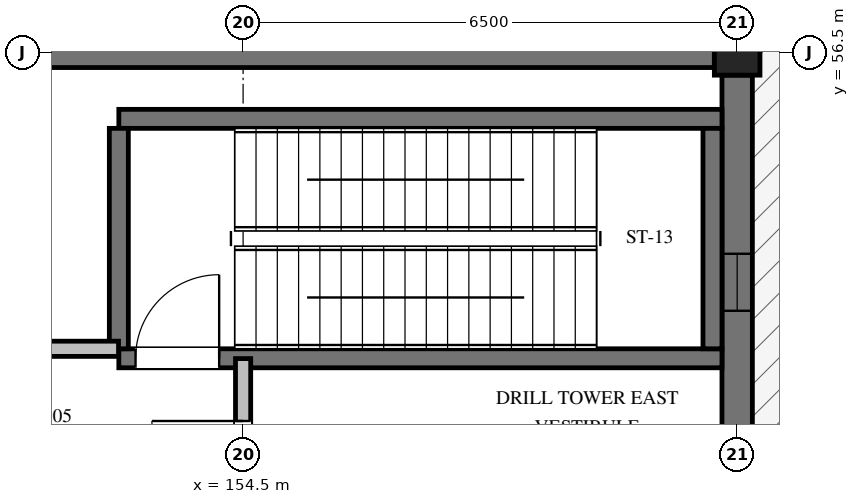
"""IFC4 building model, lengths in metres.
Left out: names, types, materials, properties, quantities, classifications, styles, units other than length and angle.
Written with IfcOpenShell. Run it as: python <this file> out.ifc"""

import sys

from ifc_helpers import new_model, si_unit, direction, frame, frame_2d, origin, origin_2d, place, context, subcontext, project, spatial, rectangle, extrude, element, fill, save


model = new_model("IFC4")
c1 = context("Model", 3, precision=1e-05, world=origin(), true_north=direction((0.0, 1.0)))
c2 = subcontext(c1, "Body", "Model", "MODEL_VIEW")
j1 = project(units=[si_unit("LENGTHUNIT", "METRE"), si_unit("PLANEANGLEUNIT", "RADIAN")], contexts=[c1])
p1 = place(None, origin())
s1 = spatial("IfcSite", under=j1, at=p1, CompositionType="ELEMENT")
p2 = place(p1, origin())
s2 = spatial("IfcBuilding", under=s1, at=p2, CompositionType="ELEMENT")
p3 = place(p2, frame((0.0, 0.0, 0.45)))
s3 = spatial("IfcBuildingStorey", under=s2, at=p3, CompositionType="ELEMENT", Elevation=0.45)
p4 = place(p3, frame((161.0, 56.5, -0.45), z_axis=(0.0, 0.0, 1.0), x_axis=(1.0, 0.0, 0.0)))
e1 = element("IfcColumn", 1, at=p4, inside=s3, PredefinedType="COLUMN", context=c2, shape_type="SweptSolid", body=[
    extrude(rectangle(XDim=0.6, YDim=0.6, at=origin_2d()), origin(), (0.0, 0.0, 1.0), 5.85),
])
p5 = place(p3, frame((148.3, 56.5, 0.0), z_axis=(0.0, 0.0, 1.0), x_axis=(1.0, 0.0, 0.0)))
e2 = element("IfcWall", 2, at=p5, inside=s3, PredefinedType="SHEAR", context=c2, shape_type="SweptSolid", body=[
    extrude(rectangle(XDim=12.4, YDim=0.4, at=frame_2d((6.2, 0.0))), origin(), (0.0, 0.0, 1.0), 5.2),
])
p6 = place(p5, frame((1.8, 0.0, 0.9)))
e3 = element("IfcOpeningElement", 3, at=p6, cuts=e2, PredefinedType="OPENING", context=c2, shape_type="SweptSolid", body=[
    extrude(rectangle(XDim=1.8, YDim=2.1, at=frame_2d((0.9, 1.05))), frame((0.0, 0.21, 0.0), z_axis=(0.0, -1.0, 0.0), x_axis=(1.0, 0.0, 0.0)), (0.0, 0.0, 1.0), 0.42),
])
p7 = place(p3, frame((161.0, 49.8, 0.0), z_axis=(0.0, 0.0, 1.0), x_axis=(0.0, 1.0, 0.0)))
e4 = element("IfcWall", 4, at=p7, inside=s3, PredefinedType="SHEAR", context=c2, shape_type="SweptSolid", body=[
    extrude(rectangle(XDim=6.4, YDim=0.4, at=frame_2d((3.2, 0.0))), origin(), (0.0, 0.0, 1.0), 5.2),
])
p8 = place(p7, frame((3.3, 0.0, 1.1)))
e5 = element("IfcOpeningElement", 5, at=p8, cuts=e4, PredefinedType="OPENING", context=c2, shape_type="SweptSolid", body=[
    extrude(rectangle(XDim=0.75, YDim=0.75, at=frame_2d((0.375, 0.375))), frame((0.0, 0.21, 0.0), z_axis=(0.0, -1.0, 0.0), x_axis=(1.0, 0.0, 0.0)), (0.0, 0.0, 1.0), 0.42),
])
p9 = place(p3, frame((152.865, 52.475, 0.0), z_axis=(0.0, 0.0, 1.0), x_axis=(1.0, 0.0, 0.0)))
e6 = element("IfcWall", 6, at=p9, inside=s3, PredefinedType="SHEAR", context=c2, shape_type="SweptSolid", body=[
    extrude(rectangle(XDim=7.935, YDim=0.25, at=frame_2d((3.968, 0.0))), origin(), (0.0, 0.0, 1.0), 5.2),
])
p10 = place(p9, frame((0.22, 0.0, 0.0)))
e7 = element("IfcOpeningElement", 7, at=p10, cuts=e6, PredefinedType="OPENING", context=c2, shape_type="SweptSolid", body=[
    extrude(rectangle(XDim=1.1, YDim=2.15, at=frame_2d((0.55, 1.075))), frame((0.0, 0.135, 0.0), z_axis=(0.0, -1.0, 0.0), x_axis=(1.0, 0.0, 0.0)), (0.0, 0.0, 1.0), 0.27),
])
p11 = place(p3, frame((152.865, 55.625, 0.0), z_axis=(0.0, 0.0, 1.0), x_axis=(1.0, 0.0, 0.0)))
e8 = element("IfcWall", 8, at=p11, inside=s3, PredefinedType="SHEAR", context=c2, shape_type="SweptSolid", body=[
    extrude(rectangle(XDim=7.935, YDim=0.25, at=frame_2d((3.968, 0.0))), origin(), (0.0, 0.0, 1.0), 5.2),
])
for number, where, z_axis, x_axis in (
    (9, (152.865, 52.6, 0.0), (0.0, 0.0, 1.0), (0.0, 1.0, 0.0)),
    (10, (160.675, 52.6, 0.0), (0.0, 0.0, 1.0), (0.0, 1.0, 0.0)),
):
    element("IfcWall", number, at=place(p3, frame(where, z_axis=z_axis, x_axis=x_axis)), inside=s3, PredefinedType="SHEAR", context=c2, shape_type="SweptSolid", body=[
        extrude(rectangle(XDim=2.9, YDim=0.25, at=frame_2d((1.45, 0.0))), origin(), (0.0, 0.0, 1.0), 5.2),
    ])
p12 = place(p3, frame((151.329, 52.6, 0.0), z_axis=(0.0, 0.0, 1.0), x_axis=(1.0, 0.0, 0.0)))
e11 = element("IfcWall", 11, at=p12, inside=s3, PredefinedType="PARTITIONING", context=c2, shape_type="SweptSolid", body=[
    extrude(rectangle(XDim=1.532, YDim=0.2, at=frame_2d((0.766, 0.0))), origin(), (0.0, 0.0, 1.0), 5.2),
])
p13 = place(p3, frame((154.5, 49.804, 0.0), z_axis=(0.0, 0.0, 1.0), x_axis=(0.0, 1.0, 0.0)))
e12 = element("IfcWall", 12, at=p13, inside=s3, PredefinedType="PARTITIONING", context=c2, shape_type="SweptSolid", body=[
    extrude(rectangle(XDim=2.667, YDim=0.2, at=frame_2d((1.333, 0.0))), origin(), (0.0, 0.0, 1.0), 5.2),
])
p14 = place(p13, frame((0.646, 0.0, 0.0)))
e13 = element("IfcOpeningElement", 13, at=p14, cuts=e12, PredefinedType="OPENING", context=c2, shape_type="SweptSolid", body=[
    extrude(rectangle(XDim=1.2, YDim=2.15, at=frame_2d((0.6, 1.075))), frame((0.0, 0.11, 0.0), z_axis=(0.0, -1.0, 0.0), x_axis=(1.0, 0.0, 0.0)), (0.0, 0.0, 1.0), 0.22),
])
p15 = place(p8, origin())
e14 = element("IfcWindow", 14, at=p15, inside=s3, PartitioningType="SINGLE_PANEL", PredefinedType="WINDOW", context=c2, shape_type="SweptSolid", body=[
    extrude(rectangle(XDim=0.75, YDim=0.75, at=frame_2d((0.375, 0.375))), frame((0.0, 0.03, 0.0), z_axis=(0.0, -1.0, 0.0), x_axis=(1.0, 0.0, 0.0)), (0.0, 0.0, 1.0), 0.06),
])
fill(e5, e14)
p16 = place(p10, frame((1.1, 0.0, 0.0), z_axis=(0.0, 0.0, 1.0), x_axis=(-1.0, 0.0, 0.0)))
e15 = element("IfcDoor", 15, at=p16, inside=s3, OperationType="SINGLE_SWING_RIGHT", PredefinedType="DOOR", context=c2, shape_type="SweptSolid", body=[
    extrude(rectangle(XDim=1.1, YDim=2.15, at=frame_2d((0.55, 1.075))), frame((0.0, 0.025, 0.0), z_axis=(0.0, -1.0, 0.0), x_axis=(1.0, 0.0, 0.0)), (0.0, 0.0, 1.0), 0.05),
])
fill(e7, e15)
p17 = place(p14, origin())
e16 = element("IfcDoor", 16, at=p17, inside=s3, OperationType="SINGLE_SWING_RIGHT", PredefinedType="DOOR", context=c2, shape_type="SweptSolid", body=[
    extrude(rectangle(XDim=1.2, YDim=2.15, at=frame_2d((0.6, 1.075))), frame((0.0, 0.025, 0.0), z_axis=(0.0, -1.0, 0.0), x_axis=(1.0, 0.0, 0.0)), (0.0, 0.0, 1.0), 0.05),
])
fill(e13, e16)
save(model, sys.argv[1])
